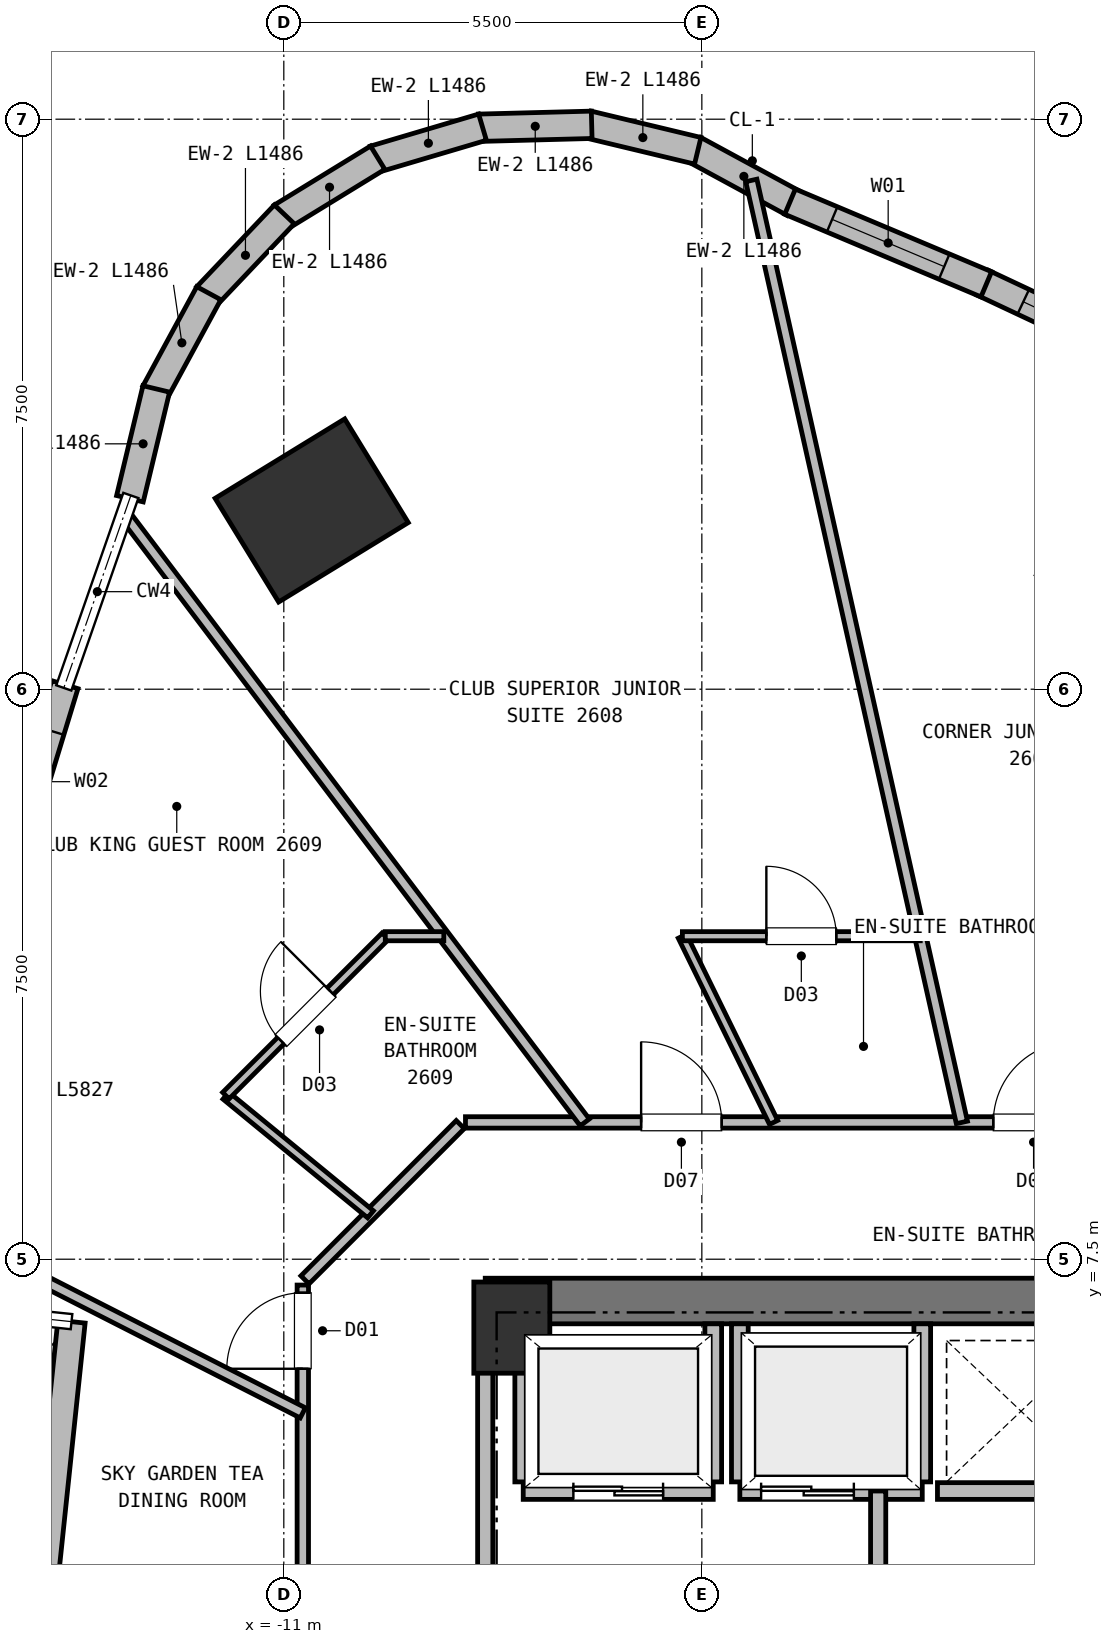
"""IFC4 building model, lengths in metres.
Left out: names, types, materials, properties, quantities, classifications, styles, units other than length and angle.
Written with IfcOpenShell. Run it as: python <this file> out.ifc"""

import sys

from ifc_helpers import new_model, si_unit, direction, frame, frame_2d, origin, origin_2d, place, context, subcontext, project, spatial, rectangle, extrude, element, fill, save


model = new_model("IFC4")
c1 = context("Model", 3, precision=1e-05, world=origin(), true_north=direction((0.0, 1.0)))
c2 = subcontext(c1, "Body", "Model", "MODEL_VIEW")
j1 = project(units=[si_unit("LENGTHUNIT", "METRE"), si_unit("PLANEANGLEUNIT", "RADIAN")], contexts=[c1])
p1 = place(None, origin())
s1 = spatial("IfcSite", under=j1, at=p1, CompositionType="ELEMENT")
p2 = place(p1, origin())
s2 = spatial("IfcBuilding", under=s1, at=p2, CompositionType="ELEMENT")
p3 = place(p2, frame((0.0, 0.0, 97.25)))
s3 = spatial("IfcBuildingStorey", under=s2, at=p3, CompositionType="ELEMENT", Elevation=97.25)
p4 = place(p3, frame((-8.0, 6.6, 0.0), z_axis=(0.0, 0.0, 1.0), x_axis=(1.0, 0.0, 0.0)))
e1 = element("IfcColumn", 1, at=p4, inside=s3, PredefinedType="COLUMN", context=c2, shape_type="SweptSolid", body=[
    extrude(rectangle(XDim=1.0, YDim=1.2, at=origin_2d()), origin(), (0.0, 0.0, 1.0), 3.75),
])
p5 = place(p3, frame((-8.35, 6.95, 0.0), z_axis=(0.0, 0.0, 1.0), x_axis=(1.0, 0.0, 0.0)))
e2 = element("IfcWall", 2, at=p5, inside=s3, PredefinedType="SHEAR", context=c2, shape_type="SweptSolid", body=[
    extrude(rectangle(XDim=16.7, YDim=0.6, at=frame_2d((8.35, 0.0))), origin(), (0.0, 0.0, 1.0), 3.5),
])
p6 = place(p3, frame((-10.633, 17.352, 0.0), z_axis=(0.0, 0.0, 1.0), x_axis=(-0.522498564716, 0.852640164354, 0.0)))
e3 = element("IfcColumn", 3, at=p6, inside=s3, PredefinedType="COLUMN", context=c2, shape_type="SweptSolid", body=[
    extrude(rectangle(XDim=1.6, YDim=2.0, at=origin_2d()), origin(), (0.0, 0.0, 1.0), 3.75),
])
p7 = place(p3, frame((-14.88, -3.665, 0.0), z_axis=(0.0, 0.0, 1.0), x_axis=(0.104508820017, 0.994523959761, 0.0)))
e4 = element("IfcWall", 4, at=p7, inside=s3, PredefinedType="SOLIDWALL", context=c2, shape_type="SweptSolid", body=[
    extrude(rectangle(XDim=10.4, YDim=0.36, at=frame_2d((5.2, 0.0))), origin(), (0.0, 0.0, 1.0), 3.5),
])
p8 = place(p7, frame((4.375, 0.0, 0.0)))
e5 = element("IfcOpeningElement", 5, at=p8, cuts=e4, PredefinedType="OPENING", context=c2, shape_type="SweptSolid", body=[
    extrude(rectangle(XDim=1.65, YDim=2.25, at=frame_2d((0.825, 1.125))), frame((0.0, 0.19, 0.0), z_axis=(0.0, -1.0, 0.0), x_axis=(1.0, 0.0, 0.0)), (0.0, 0.0, 1.0), 0.38),
])
for number, where, z_axis, x_axis in (
    (6, (-5.6, 22.102, 0.0), (0.0, 0.0, 1.0), (0.879, -0.477, 0.0)),
    (7, (-6.999, 22.431, 0.0), (0.0, 0.0, 1.0), (0.972, -0.233, 0.0)),
    (8, (-8.435, 22.387, 0.0), (0.0, 0.0, 1.0), (1.0, 0.026, 0.0)),
    (9, (-9.81, 21.973, 0.0), (0.0, 0.0, 1.0), (0.959, 0.284, 0.0)),
    (10, (-11.032, 21.217, 0.0), (0.0, 0.0, 1.0), (0.853, 0.523, 0.0)),
    (11, (-12.016, 20.17, 0.0), (0.0, 0.0, 1.0), (0.688, 0.725, 0.0)),
    (12, (-12.696, 18.905, 0.0), (0.0, 0.0, 1.0), (0.477, 0.879, 0.0)),
):
    element("IfcWall", number, at=place(p3, frame(where, z_axis=z_axis, x_axis=x_axis)), inside=s3, PredefinedType="SOLIDWALL", context=c2, shape_type="SweptSolid", body=[
        extrude(rectangle(XDim=1.486, YDim=0.36, at=frame_2d((0.743, 0.0))), origin(), (0.0, 0.0, 1.0), 3.5),
    ])
p9 = place(p3, frame((-13.025, 17.506, 0.0), z_axis=(0.0, 0.0, 1.0), x_axis=(0.23351590147, 0.972352983109, 0.0)))
e13 = element("IfcWall", 13, at=p9, inside=s3, PredefinedType="SOLIDWALL", context=c2, shape_type="SweptSolid", body=[
    extrude(rectangle(XDim=1.486, YDim=0.36, at=frame_2d((0.743, 0.0))), origin(), (0.0, 0.0, 1.0), 3.5),
])
p10 = place(p3, frame((-14.66, 12.507, 0.0), z_axis=(0.0, 0.0, 1.0), x_axis=(0.291842096338, 0.956466513164, 0.0)))
e14 = element("IfcWall", 14, at=p10, inside=s3, PredefinedType="SOLIDWALL", context=c2, shape_type="SweptSolid", body=[
    extrude(rectangle(XDim=2.669, YDim=0.36, at=frame_2d((1.335, 0.0))), origin(), (0.0, 0.0, 1.0), 3.5),
])
p11 = place(p10, frame((0.635, 0.0, 0.72)))
e15 = element("IfcOpeningElement", 15, at=p11, cuts=e14, PredefinedType="OPENING", context=c2, shape_type="SweptSolid", body=[
    extrude(rectangle(XDim=1.4, YDim=1.84, at=frame_2d((0.7, 0.92))), frame((0.0, 0.19, 0.0), z_axis=(0.0, -1.0, 0.0), x_axis=(1.0, 0.0, 0.0)), (0.0, 0.0, 1.0), 0.38),
])
p12 = place(p3, frame((-1.803, 20.348, 0.0), z_axis=(0.0, 0.0, 1.0), x_axis=(0.905061598697, -0.425280498688, 0.0)))
e16 = element("IfcWall", 16, at=p12, inside=s3, PredefinedType="SOLIDWALL", context=c2, shape_type="SweptSolid", body=[
    extrude(rectangle(XDim=2.777, YDim=0.36, at=frame_2d((1.389, 0.0))), origin(), (0.0, 0.0, 1.0), 3.5),
])
p13 = place(p12, frame((0.589, 0.0, 0.72)))
e17 = element("IfcOpeningElement", 17, at=p13, cuts=e16, PredefinedType="OPENING", context=c2, shape_type="SweptSolid", body=[
    extrude(rectangle(XDim=1.6, YDim=1.88, at=frame_2d((0.8, 0.94))), frame((0.0, 0.19, 0.0), z_axis=(0.0, -1.0, 0.0), x_axis=(1.0, 0.0, 0.0)), (0.0, 0.0, 1.0), 0.38),
])
p14 = place(p3, frame((-4.339, 21.415, 0.0), z_axis=(0.0, 0.0, 1.0), x_axis=(0.921579586259, -0.388189472025, 0.0)))
e18 = element("IfcWall", 18, at=p14, inside=s3, PredefinedType="SOLIDWALL", context=c2, shape_type="SweptSolid", body=[
    extrude(rectangle(XDim=2.801, YDim=0.36, at=frame_2d((1.401, 0.0))), origin(), (0.0, 0.0, 1.0), 3.5),
])
p15 = place(p14, frame((0.601, 0.0, 0.72)))
e19 = element("IfcOpeningElement", 19, at=p15, cuts=e18, PredefinedType="OPENING", context=c2, shape_type="SweptSolid", body=[
    extrude(rectangle(XDim=1.6, YDim=1.88, at=frame_2d((0.8, 0.94))), frame((0.0, 0.19, 0.0), z_axis=(0.0, -1.0, 0.0), x_axis=(1.0, 0.0, 0.0)), (0.0, 0.0, 1.0), 0.38),
])
p16 = place(p3, frame((-7.85, 4.45, 0.0), z_axis=(0.0, 0.0, 1.0), x_axis=(1.0, 0.0, 0.0)))
e20 = element("IfcWall", 20, at=p16, inside=s3, PredefinedType="PARTITIONING", context=c2, shape_type="SweptSolid", body=[
    extrude(rectangle(XDim=2.5, YDim=0.22, at=frame_2d((1.25, 0.0))), origin(), (0.0, 0.0, 1.0), 3.5),
])
p17 = place(p16, frame((0.66, 0.0, 0.0)))
e21 = element("IfcOpeningElement", 21, at=p17, cuts=e20, PredefinedType="OPENING", context=c2, shape_type="SweptSolid", body=[
    extrude(rectangle(XDim=1.18, YDim=2.15, at=frame_2d((0.59, 1.075))), frame((0.0, 0.12, 0.0), z_axis=(0.0, -1.0, 0.0), x_axis=(1.0, 0.0, 0.0)), (0.0, 0.0, 1.0), 0.24),
])
p18 = place(p3, frame((-7.85, 4.57, 0.0), z_axis=(0.0, 0.0, 1.0), x_axis=(0.0, 1.0, 0.0)))
e22 = element("IfcWall", 22, at=p18, inside=s3, PredefinedType="PARTITIONING", context=c2, shape_type="SweptSolid", body=[
    extrude(rectangle(XDim=2.08, YDim=0.22, at=frame_2d((1.04, 0.0))), origin(), (0.0, 0.0, 1.0), 3.12),
])
p19 = place(p3, frame((-5.35, 4.57, 0.0), z_axis=(0.0, 0.0, 1.0), x_axis=(0.0, 1.0, 0.0)))
e23 = element("IfcWall", 23, at=p19, inside=s3, PredefinedType="PARTITIONING", context=c2, shape_type="SweptSolid", body=[
    extrude(rectangle(XDim=2.08, YDim=0.22, at=frame_2d((1.04, 0.0))), origin(), (0.0, 0.0, 1.0), 3.5),
])
p20 = place(p3, frame((-5.0, 4.45, 0.0), z_axis=(0.0, 0.0, 1.0), x_axis=(1.0, 0.0, 0.0)))
e24 = element("IfcWall", 24, at=p20, inside=s3, PredefinedType="PARTITIONING", context=c2, shape_type="SweptSolid", body=[
    extrude(rectangle(XDim=2.4, YDim=0.22, at=frame_2d((1.2, 0.0))), origin(), (0.0, 0.0, 1.0), 3.5),
])
p21 = place(p20, frame((0.28, 0.0, 0.0)))
e25 = element("IfcOpeningElement", 25, at=p21, cuts=e24, PredefinedType="OPENING", context=c2, shape_type="SweptSolid", body=[
    extrude(rectangle(XDim=1.22, YDim=2.15, at=frame_2d((0.61, 1.075))), frame((0.0, 0.12, 0.0), z_axis=(0.0, -1.0, 0.0), x_axis=(1.0, 0.0, 0.0)), (0.0, 0.0, 1.0), 0.24),
])
for number, where, z_axis, x_axis in (
    (26, (-5.0, 4.57, 0.0), (0.0, 0.0, 1.0), (0.0, 1.0, 0.0)),
    (27, (-2.6, 4.57, 0.0), (0.0, 0.0, 1.0), (0.0, 1.0, 0.0)),
):
    element("IfcWall", number, at=place(p3, frame(where, z_axis=z_axis, x_axis=x_axis)), inside=s3, PredefinedType="PARTITIONING", context=c2, shape_type="SweptSolid", body=[
        extrude(rectangle(XDim=2.08, YDim=0.22, at=frame_2d((1.04, 0.0))), origin(), (0.0, 0.0, 1.0), 3.5),
    ])
p22 = place(p3, frame((-2.4, 4.45, 0.0), z_axis=(0.0, 0.0, 1.0), x_axis=(1.0, 0.0, 0.0)))
e28 = element("IfcWall", 28, at=p22, inside=s3, PredefinedType="PARTITIONING", context=c2, shape_type="SweptSolid", body=[
    extrude(rectangle(XDim=2.2, YDim=0.22, at=frame_2d((1.1, 0.0))), origin(), (0.0, 0.0, 1.0), 3.5),
])
p23 = place(p3, frame((-3.18, 1.15, 0.0), z_axis=(0.0, 0.0, 1.0), x_axis=(0.0, 1.0, 0.0)))
e29 = element("IfcWall", 29, at=p23, inside=s3, PredefinedType="PARTITIONING", context=c2, shape_type="SweptSolid", body=[
    extrude(rectangle(XDim=3.3, YDim=0.2, at=frame_2d((1.65, 0.0))), origin(), (0.0, 0.0, 1.0), 3.5),
])
p24 = place(p23, frame((1.08, 0.0, 0.0)))
e30 = element("IfcOpeningElement", 30, at=p24, cuts=e29, PredefinedType="OPENING", context=c2, shape_type="SweptSolid", body=[
    extrude(rectangle(XDim=1.15, YDim=2.15, at=frame_2d((0.575, 1.075))), frame((0.0, 0.11, 0.0), z_axis=(0.0, -1.0, 0.0), x_axis=(1.0, 0.0, 0.0)), (0.0, 0.0, 1.0), 0.22),
])
p25 = place(p3, frame((-8.35, 1.15, 0.0), z_axis=(0.0, 0.0, 1.0), x_axis=(0.0, 1.0, 0.0)))
e31 = element("IfcWall", 31, at=p25, inside=s3, PredefinedType="PARTITIONING", context=c2, shape_type="SweptSolid", body=[
    extrude(rectangle(XDim=5.4, YDim=0.2, at=frame_2d((2.7, 0.0))), origin(), (0.0, 0.0, 1.0), 3.5),
])
p26 = place(p25, frame((0.95, 0.0, 0.0)))
e32 = element("IfcOpeningElement", 32, at=p26, cuts=e31, PredefinedType="OPENING", context=c2, shape_type="SweptSolid", body=[
    extrude(rectangle(XDim=1.15, YDim=2.15, at=frame_2d((0.575, 1.075))), frame((0.0, 0.11, 0.0), z_axis=(0.0, -1.0, 0.0), x_axis=(1.0, 0.0, 0.0)), (0.0, 0.0, 1.0), 0.22),
])
p27 = place(p3, frame((-8.61, 9.3, 0.0), z_axis=(0.0, 0.0, 1.0), x_axis=(1.0, 0.0, 0.0)))
e33 = element("IfcWall", 33, at=p27, inside=s3, PredefinedType="PARTITIONING", context=c2, shape_type="SweptSolid", body=[
    extrude(rectangle(XDim=17.22, YDim=0.15, at=frame_2d((8.61, 0.0))), origin(), (0.0, 0.0, 1.0), 3.5),
])
p28 = place(p27, frame((11.167, 0.0, 0.0)))
e34 = element("IfcOpeningElement", 34, at=p28, cuts=e33, PredefinedType="OPENING", context=c2, shape_type="SweptSolid", body=[
    extrude(rectangle(XDim=1.0, YDim=2.15, at=frame_2d((0.5, 1.075))), frame((0.0, 0.085, 0.0), z_axis=(0.0, -1.0, 0.0), x_axis=(1.0, 0.0, 0.0)), (0.0, 0.0, 1.0), 0.17),
])
p29 = place(p27, frame((6.944, 0.0, 0.0)))
e35 = element("IfcOpeningElement", 35, at=p29, cuts=e33, PredefinedType="OPENING", context=c2, shape_type="SweptSolid", body=[
    extrude(rectangle(XDim=1.06, YDim=2.15, at=frame_2d((0.53, 1.075))), frame((0.0, 0.085, 0.0), z_axis=(0.0, -1.0, 0.0), x_axis=(1.0, 0.0, 0.0)), (0.0, 0.0, 1.0), 0.17),
])
p30 = place(p27, frame((2.311, 0.0, 0.0)))
e36 = element("IfcOpeningElement", 36, at=p30, cuts=e33, PredefinedType="OPENING", context=c2, shape_type="SweptSolid", body=[
    extrude(rectangle(XDim=1.06, YDim=2.15, at=frame_2d((0.53, 1.075))), frame((0.0, 0.085, 0.0), z_axis=(0.0, -1.0, 0.0), x_axis=(1.0, 0.0, 0.0)), (0.0, 0.0, 1.0), 0.17),
])
p31 = place(p3, frame((-10.722, 7.228, 0.0), z_axis=(0.0, 0.0, 1.0), x_axis=(0.707106781187, 0.707106781187, 0.0)))
e37 = element("IfcWall", 37, at=p31, inside=s3, PredefinedType="PARTITIONING", context=c2, shape_type="SweptSolid", body=[
    extrude(rectangle(XDim=2.89, YDim=0.15, at=frame_2d((1.445, 0.0))), origin(), (0.0, 0.0, 1.0), 3.5),
])
p32 = place(p3, frame((-10.75, -5.76, 0.0), z_axis=(0.0, 0.0, 1.0), x_axis=(0.0, 1.0, 0.0)))
e38 = element("IfcWall", 38, at=p32, inside=s3, PredefinedType="PARTITIONING", context=c2, shape_type="SweptSolid", body=[
    extrude(rectangle(XDim=12.92, YDim=0.15, at=frame_2d((6.46, 0.0))), origin(), (0.0, 0.0, 1.0), 3.5),
])
p33 = place(p32, frame((3.096, 0.0, 0.0)))
e39 = element("IfcOpeningElement", 39, at=p33, cuts=e38, PredefinedType="OPENING", context=c2, shape_type="SweptSolid", body=[
    extrude(rectangle(XDim=0.95, YDim=2.1, at=frame_2d((0.475, 1.05))), frame((0.0, 0.085, 0.0), z_axis=(0.0, -1.0, 0.0), x_axis=(1.0, 0.0, 0.0)), (0.0, 0.0, 1.0), 0.17),
])
p34 = place(p32, frame((1.118, 0.0, 0.0)))
e40 = element("IfcOpeningElement", 40, at=p34, cuts=e38, PredefinedType="OPENING", context=c2, shape_type="SweptSolid", body=[
    extrude(rectangle(XDim=0.95, YDim=2.1, at=frame_2d((0.475, 1.05))), frame((0.0, 0.085, 0.0), z_axis=(0.0, -1.0, 0.0), x_axis=(1.0, 0.0, 0.0)), (0.0, 0.0, 1.0), 0.17),
])
p35 = place(p32, frame((7.699, 0.0, 0.0)))
e41 = element("IfcOpeningElement", 41, at=p35, cuts=e38, PredefinedType="OPENING", context=c2, shape_type="SweptSolid", body=[
    extrude(rectangle(XDim=1.0, YDim=2.15, at=frame_2d((0.5, 1.075))), frame((0.0, 0.085, 0.0), z_axis=(0.0, -1.0, 0.0), x_axis=(1.0, 0.0, 0.0)), (0.0, 0.0, 1.0), 0.17),
])
p36 = place(p32, frame((11.819, 0.0, 0.0)))
e42 = element("IfcOpeningElement", 42, at=p36, cuts=e38, PredefinedType="OPENING", context=c2, shape_type="SweptSolid", body=[
    extrude(rectangle(XDim=1.0, YDim=2.15, at=frame_2d((0.5, 1.075))), frame((0.0, 0.085, 0.0), z_axis=(0.0, -1.0, 0.0), x_axis=(1.0, 0.0, 0.0)), (0.0, 0.0, 1.0), 0.17),
])
p37 = place(p3, frame((-2.079, 9.3, 0.0), z_axis=(0.0, 0.0, 1.0), x_axis=(-0.218143379007, 0.975916731179, 0.0)))
e43 = element("IfcWall", 43, at=p37, inside=s3, PredefinedType="PARTITIONING", context=c2, shape_type="SweptSolid", body=[
    extrude(rectangle(XDim=12.7, YDim=0.15, at=frame_2d((6.35, 0.0))), origin(), (0.0, 0.0, 1.0), 3.5),
])
p38 = place(p3, frame((-5.756, 11.75, 0.0), z_axis=(0.0, 0.0, 1.0), x_axis=(0.439932257938, -0.898030961841, 0.0)))
e44 = element("IfcWall", 44, at=p38, inside=s3, PredefinedType="PARTITIONING", context=c2, shape_type="SweptSolid", body=[
    extrude(rectangle(XDim=2.728, YDim=0.12, at=frame_2d((1.364, 0.0))), origin(), (0.0, 0.0, 1.0), 3.5),
])
p39 = place(p3, frame((-5.756, 11.75, 0.0), z_axis=(0.0, 0.0, 1.0), x_axis=(1.0, 0.0, 0.0)))
e45 = element("IfcWall", 45, at=p39, inside=s3, PredefinedType="PARTITIONING", context=c2, shape_type="SweptSolid", body=[
    extrude(rectangle(XDim=3.13, YDim=0.12, at=frame_2d((1.565, 0.0))), origin(), (0.0, 0.0, 1.0), 3.5),
])
p40 = place(p39, frame((1.105, 0.0, 0.0)))
e46 = element("IfcOpeningElement", 46, at=p40, cuts=e45, PredefinedType="OPENING", context=c2, shape_type="SweptSolid", body=[
    extrude(rectangle(XDim=0.92, YDim=2.1, at=frame_2d((0.46, 1.05))), frame((0.0, 0.07, 0.0), z_axis=(0.0, -1.0, 0.0), x_axis=(1.0, 0.0, 0.0)), (0.0, 0.0, 1.0), 0.14),
])
p41 = place(p3, frame((-7.04, 9.3, 0.0), z_axis=(0.0, 0.0, 1.0), x_axis=(-0.60357057416, 0.797309577271, 0.0)))
e47 = element("IfcWall", 47, at=p41, inside=s3, PredefinedType="PARTITIONING", context=c2, shape_type="SweptSolid", body=[
    extrude(rectangle(XDim=10.037, YDim=0.15, at=frame_2d((5.019, 0.0))), origin(), (0.0, 0.0, 1.0), 3.5),
])
p42 = place(p3, frame((-11.762, 9.653, 0.0), z_axis=(0.0, 0.0, 1.0), x_axis=(0.773019750399, -0.634381955523, 0.0)))
e48 = element("IfcWall", 48, at=p42, inside=s3, PredefinedType="PARTITIONING", context=c2, shape_type="SweptSolid", body=[
    extrude(rectangle(XDim=2.462, YDim=0.12, at=frame_2d((1.231, 0.0))), origin(), (0.0, 0.0, 1.0), 3.5),
])
p43 = place(p3, frame((-11.762, 9.653, 0.0), z_axis=(0.0, 0.0, 1.0), x_axis=(0.707106781187, 0.707106781187, 0.0)))
e49 = element("IfcWall", 49, at=p43, inside=s3, PredefinedType="PARTITIONING", context=c2, shape_type="SweptSolid", body=[
    extrude(rectangle(XDim=2.966, YDim=0.12, at=frame_2d((1.483, 0.0))), origin(), (0.0, 0.0, 1.0), 3.5),
])
p44 = place(p43, frame((1.023, 0.0, 0.0)))
e50 = element("IfcOpeningElement", 50, at=p44, cuts=e49, PredefinedType="OPENING", context=c2, shape_type="SweptSolid", body=[
    extrude(rectangle(XDim=0.92, YDim=2.1, at=frame_2d((0.46, 1.05))), frame((0.0, 0.07, 0.0), z_axis=(0.0, -1.0, 0.0), x_axis=(1.0, 0.0, 0.0)), (0.0, 0.0, 1.0), 0.14),
])
p45 = place(p3, frame((-8.895, 11.75, 0.0), z_axis=(0.0, 0.0, 1.0), x_axis=(-1.0, 0.0, 0.0)))
e51 = element("IfcWall", 51, at=p45, inside=s3, PredefinedType="PARTITIONING", context=c2, shape_type="SweptSolid", body=[
    extrude(rectangle(XDim=0.77, YDim=0.12, at=frame_2d((0.385, 0.0))), origin(), (0.0, 0.0, 1.0), 3.5),
])
p46 = place(p3, frame((-10.75, 5.478, 0.0), z_axis=(0.0, 0.0, 1.0), x_axis=(-0.890978705021, 0.454045093796, 0.0)))
e52 = element("IfcWall", 52, at=p46, inside=s3, PredefinedType="PARTITIONING", context=c2, shape_type="SweptSolid", body=[
    extrude(rectangle(XDim=5.579, YDim=0.15, at=frame_2d((2.789, 0.0))), origin(), (0.0, 0.0, 1.0), 3.5),
])
p47 = place(p11, origin())
e53 = element("IfcWindow", 53, at=p47, inside=s3, PartitioningType="SINGLE_PANEL", PredefinedType="WINDOW", context=c2, shape_type="SweptSolid", body=[
    extrude(rectangle(XDim=1.4, YDim=1.84, at=frame_2d((0.7, 0.92))), frame((0.0, 0.03, 0.0), z_axis=(0.0, -1.0, 0.0), x_axis=(1.0, 0.0, 0.0)), (0.0, 0.0, 1.0), 0.06),
])
fill(e15, e53)
p48 = place(p13, origin())
e54 = element("IfcWindow", 54, at=p48, inside=s3, PartitioningType="SINGLE_PANEL", PredefinedType="WINDOW", context=c2, shape_type="SweptSolid", body=[
    extrude(rectangle(XDim=1.6, YDim=1.88, at=frame_2d((0.8, 0.94))), frame((0.0, 0.03, 0.0), z_axis=(0.0, -1.0, 0.0), x_axis=(1.0, 0.0, 0.0)), (0.0, 0.0, 1.0), 0.06),
])
fill(e17, e54)
p49 = place(p15, origin())
e55 = element("IfcWindow", 55, at=p49, inside=s3, PartitioningType="SINGLE_PANEL", PredefinedType="WINDOW", context=c2, shape_type="SweptSolid", body=[
    extrude(rectangle(XDim=1.6, YDim=1.88, at=frame_2d((0.8, 0.94))), frame((0.0, 0.03, 0.0), z_axis=(0.0, -1.0, 0.0), x_axis=(1.0, 0.0, 0.0)), (0.0, 0.0, 1.0), 0.06),
])
fill(e19, e55)
p50 = place(p17, origin())
e56 = element("IfcDoor", 56, at=p50, inside=s3, OperationType="DOUBLE_DOOR_SLIDING", PredefinedType="DOOR", context=c2, shape_type="SweptSolid", body=[
    extrude(rectangle(XDim=1.18, YDim=2.15, at=frame_2d((0.59, 1.075))), frame((0.0, 0.025, 0.0), z_axis=(0.0, -1.0, 0.0), x_axis=(1.0, 0.0, 0.0)), (0.0, 0.0, 1.0), 0.05),
])
fill(e21, e56)
p51 = place(p21, origin())
e57 = element("IfcDoor", 57, at=p51, inside=s3, OperationType="DOUBLE_DOOR_SLIDING", PredefinedType="DOOR", context=c2, shape_type="SweptSolid", body=[
    extrude(rectangle(XDim=1.22, YDim=2.15, at=frame_2d((0.61, 1.075))), frame((0.0, 0.025, 0.0), z_axis=(0.0, -1.0, 0.0), x_axis=(1.0, 0.0, 0.0)), (0.0, 0.0, 1.0), 0.05),
])
fill(e25, e57)
p52 = place(p40, origin())
e58 = element("IfcDoor", 58, at=p52, inside=s3, OperationType="SINGLE_SWING_LEFT", PredefinedType="DOOR", context=c2, shape_type="SweptSolid", body=[
    extrude(rectangle(XDim=0.92, YDim=2.1, at=frame_2d((0.46, 1.05))), frame((0.0, 0.025, 0.0), z_axis=(0.0, -1.0, 0.0), x_axis=(1.0, 0.0, 0.0)), (0.0, 0.0, 1.0), 0.05),
])
fill(e46, e58)
p53 = place(p44, origin())
e59 = element("IfcDoor", 59, at=p53, inside=s3, OperationType="SINGLE_SWING_RIGHT", PredefinedType="DOOR", context=c2, shape_type="SweptSolid", body=[
    extrude(rectangle(XDim=0.92, YDim=2.1, at=frame_2d((0.46, 1.05))), frame((0.0, 0.025, 0.0), z_axis=(0.0, -1.0, 0.0), x_axis=(1.0, 0.0, 0.0)), (0.0, 0.0, 1.0), 0.05),
])
fill(e50, e59)
p54 = place(p36, origin())
e60 = element("IfcDoor", 60, at=p54, inside=s3, OperationType="SINGLE_SWING_LEFT", PredefinedType="DOOR", context=c2, shape_type="SweptSolid", body=[
    extrude(rectangle(XDim=1.0, YDim=2.15, at=frame_2d((0.5, 1.075))), frame((0.0, 0.025, 0.0), z_axis=(0.0, -1.0, 0.0), x_axis=(1.0, 0.0, 0.0)), (0.0, 0.0, 1.0), 0.05),
])
fill(e42, e60)
p55 = place(p29, origin())
e61 = element("IfcDoor", 61, at=p55, inside=s3, OperationType="SINGLE_SWING_RIGHT", PredefinedType="DOOR", context=c2, shape_type="SweptSolid", body=[
    extrude(rectangle(XDim=1.06, YDim=2.15, at=frame_2d((0.53, 1.075))), frame((0.0, 0.025, 0.0), z_axis=(0.0, -1.0, 0.0), x_axis=(1.0, 0.0, 0.0)), (0.0, 0.0, 1.0), 0.05),
])
fill(e35, e61)
p56 = place(p30, origin())
e62 = element("IfcDoor", 62, at=p56, inside=s3, OperationType="SINGLE_SWING_LEFT", PredefinedType="DOOR", context=c2, shape_type="SweptSolid", body=[
    extrude(rectangle(XDim=1.06, YDim=2.15, at=frame_2d((0.53, 1.075))), frame((0.0, 0.025, 0.0), z_axis=(0.0, -1.0, 0.0), x_axis=(1.0, 0.0, 0.0)), (0.0, 0.0, 1.0), 0.05),
])
fill(e36, e62)
save(model, sys.argv[1])
